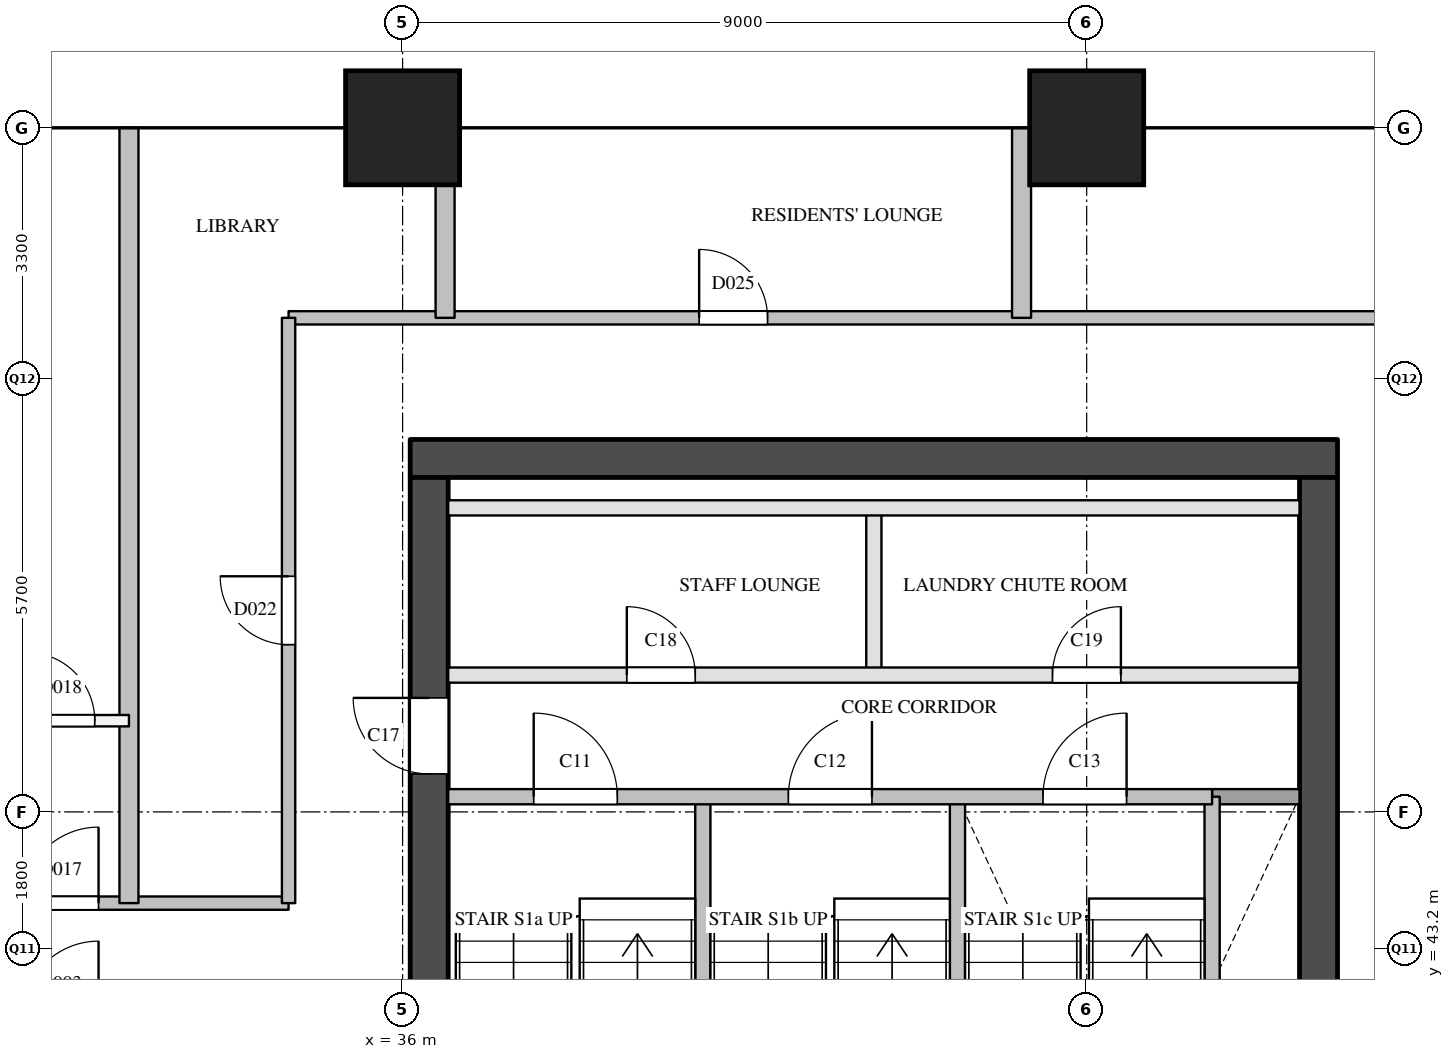
"""IFC4 building model, lengths in metres.
Left out: names, types, materials, properties, quantities, classifications, styles, units other than length and angle.
Written with IfcOpenShell. Run it as: python <this file> out.ifc"""

import sys

from ifc_helpers import new_model, si_unit, direction, frame, frame_2d, origin, origin_2d, place, context, subcontext, project, spatial, rectangle, extrude, element, fill, save


model = new_model("IFC4")
c1 = context("Model", 3, precision=1e-05, world=origin(), true_north=direction((0.0, 1.0)))
c2 = subcontext(c1, "Body", "Model", "MODEL_VIEW")
j1 = project(units=[si_unit("LENGTHUNIT", "METRE"), si_unit("PLANEANGLEUNIT", "RADIAN")], contexts=[c1])
p1 = place(None, origin())
s1 = spatial("IfcSite", under=j1, at=p1, CompositionType="ELEMENT")
p2 = place(p1, origin())
s2 = spatial("IfcBuilding", under=s1, at=p2, CompositionType="ELEMENT")
p3 = place(p2, frame((0.0, 0.0, 193.4)))
s3 = spatial("IfcBuildingStorey", under=s2, at=p3, CompositionType="ELEMENT", Elevation=193.4)
for number, where, z_axis, x_axis in (
    (1, (36.0, 54.0, 0.0), (0.0, 0.0, 1.0), (1.0, 0.0, 0.0)),
    (2, (45.0, 54.0, 0.0), (0.0, 0.0, 1.0), (1.0, 0.0, 0.0)),
):
    element("IfcColumn", number, at=place(p3, frame(where, z_axis=z_axis, x_axis=x_axis)), inside=s3, PredefinedType="COLUMN", context=c2, shape_type="SweptSolid", body=[
        extrude(rectangle(XDim=1.5, YDim=1.5, at=origin_2d()), origin(), (0.0, 0.0, 1.0), 3.9),
    ])
p4 = place(p3, frame((36.1, 49.65, 0.0), z_axis=(0.0, 0.0, 1.0), x_axis=(1.0, 0.0, 0.0)))
e3 = element("IfcWall", 3, at=p4, inside=s3, PredefinedType="SHEAR", context=c2, shape_type="SweptSolid", body=[
    extrude(rectangle(XDim=12.2, YDim=0.5, at=frame_2d((6.1, 0.0))), origin(), (0.0, 0.0, 1.0), 3.4),
])
p5 = place(p3, frame((36.35, 29.1, 0.0), z_axis=(0.0, 0.0, 1.0), x_axis=(0.0, 1.0, 0.0)))
e4 = element("IfcWall", 4, at=p5, inside=s3, PredefinedType="SHEAR", context=c2, shape_type="SweptSolid", body=[
    extrude(rectangle(XDim=20.3, YDim=0.5, at=frame_2d((10.15, 0.0))), origin(), (0.0, 0.0, 1.0), 3.4),
])
p6 = place(p5, frame((3.6, 0.0, 0.0)))
e5 = element("IfcOpeningElement", 5, at=p6, cuts=e4, PredefinedType="OPENING", context=c2, shape_type="SweptSolid", body=[
    extrude(rectangle(XDim=1.8, YDim=2.1, at=frame_2d((0.9, 1.05))), frame((0.0, 0.26, 0.0), z_axis=(0.0, -1.0, 0.0), x_axis=(1.0, 0.0, 0.0)), (0.0, 0.0, 1.0), 0.52),
])
p7 = place(p5, frame((16.4, 0.0, 0.0)))
e6 = element("IfcOpeningElement", 6, at=p7, cuts=e4, PredefinedType="OPENING", context=c2, shape_type="SweptSolid", body=[
    extrude(rectangle(XDim=1.0, YDim=2.1, at=frame_2d((0.5, 1.05))), frame((0.0, 0.26, 0.0), z_axis=(0.0, -1.0, 0.0), x_axis=(1.0, 0.0, 0.0)), (0.0, 0.0, 1.0), 0.52),
])
p8 = place(p3, frame((48.05, 29.1, 0.0), z_axis=(0.0, 0.0, 1.0), x_axis=(0.0, 1.0, 0.0)))
e7 = element("IfcWall", 7, at=p8, inside=s3, PredefinedType="SHEAR", context=c2, shape_type="SweptSolid", body=[
    extrude(rectangle(XDim=20.3, YDim=0.5, at=frame_2d((10.15, 0.0))), origin(), (0.0, 0.0, 1.0), 3.4),
])
p9 = place(p8, frame((12.5, 0.0, 0.0)))
e8 = element("IfcOpeningElement", 8, at=p9, cuts=e7, PredefinedType="OPENING", context=c2, shape_type="SweptSolid", body=[
    extrude(rectangle(XDim=0.7, YDim=2.1, at=frame_2d((0.35, 1.05))), frame((0.0, 0.26, 0.0), z_axis=(0.0, -1.0, 0.0), x_axis=(1.0, 0.0, 0.0)), (0.0, 0.0, 1.0), 0.52),
])
p10 = place(p8, frame((3.9, 0.0, 0.0)))
e9 = element("IfcOpeningElement", 9, at=p10, cuts=e7, PredefinedType="OPENING", context=c2, shape_type="SweptSolid", body=[
    extrude(rectangle(XDim=1.8, YDim=2.1, at=frame_2d((0.9, 1.05))), frame((0.0, 0.26, 0.0), z_axis=(0.0, -1.0, 0.0), x_axis=(1.0, 0.0, 0.0)), (0.0, 0.0, 1.0), 0.52),
])
p11 = place(p3, frame((39.95, 40.78, 0.0), z_axis=(0.0, 0.0, 1.0), x_axis=(0.0, 1.0, 0.0)))
e10 = element("IfcWall", 10, at=p11, inside=s3, PredefinedType="SOLIDWALL", context=c2, shape_type="SweptSolid", body=[
    extrude(rectangle(XDim=4.42, YDim=0.2, at=frame_2d((2.21, 0.0))), origin(), (0.0, 0.0, 1.0), 3.4),
])
p12 = place(p3, frame((42.2, 46.8, 0.0), z_axis=(0.0, 0.0, 1.0), x_axis=(0.0, 1.0, 0.0)))
e11 = element("IfcWall", 11, at=p12, inside=s3, PredefinedType="PARTITIONING", context=c2, shape_type="SweptSolid", body=[
    extrude(rectangle(XDim=2.2, YDim=0.2, at=frame_2d((1.1, 0.0))), origin(), (0.0, 0.0, 1.0), 3.4),
])
for number, where, z_axis, x_axis in (
    (12, (43.3, 40.78, 0.0), (0.0, 0.0, 1.0), (0.0, 1.0, 0.0)),
    (13, (46.65, 40.78, 0.0), (0.0, 0.0, 1.0), (0.0, 1.0, 0.0)),
):
    element("IfcWall", number, at=place(p3, frame(where, z_axis=z_axis, x_axis=x_axis)), inside=s3, PredefinedType="SOLIDWALL", context=c2, shape_type="SweptSolid", body=[
        extrude(rectangle(XDim=4.42, YDim=0.2, at=frame_2d((2.21, 0.0))), origin(), (0.0, 0.0, 1.0), 3.4),
    ])
p13 = place(p3, frame((46.65, 45.2, 0.0), z_axis=(0.0, 0.0, 1.0), x_axis=(1.0, 0.0, 0.0)))
e14 = element("IfcWall", 14, at=p13, inside=s3, PredefinedType="SOLIDWALL", context=c2, shape_type="SweptSolid", body=[
    extrude(rectangle(XDim=1.15, YDim=0.2, at=frame_2d((0.575, 0.0))), origin(), (0.0, 0.0, 1.0), 3.4),
])
p14 = place(p3, frame((36.6, 45.2, 0.0), z_axis=(0.0, 0.0, 1.0), x_axis=(1.0, 0.0, 0.0)))
e15 = element("IfcWall", 15, at=p14, inside=s3, PredefinedType="SOLIDWALL", context=c2, shape_type="SweptSolid", body=[
    extrude(rectangle(XDim=10.05, YDim=0.2, at=frame_2d((5.025, 0.0))), origin(), (0.0, 0.0, 1.0), 3.4),
])
p15 = place(p14, frame((1.125, 0.0, 0.0)))
e16 = element("IfcOpeningElement", 16, at=p15, cuts=e15, PredefinedType="OPENING", context=c2, shape_type="SweptSolid", body=[
    extrude(rectangle(XDim=1.1, YDim=2.1, at=frame_2d((0.55, 1.05))), frame((0.0, 0.11, 0.0), z_axis=(0.0, -1.0, 0.0), x_axis=(1.0, 0.0, 0.0)), (0.0, 0.0, 1.0), 0.22),
])
p16 = place(p14, frame((4.475, 0.0, 0.0)))
e17 = element("IfcOpeningElement", 17, at=p16, cuts=e15, PredefinedType="OPENING", context=c2, shape_type="SweptSolid", body=[
    extrude(rectangle(XDim=1.1, YDim=2.1, at=frame_2d((0.55, 1.05))), frame((0.0, 0.11, 0.0), z_axis=(0.0, -1.0, 0.0), x_axis=(1.0, 0.0, 0.0)), (0.0, 0.0, 1.0), 0.22),
])
p17 = place(p14, frame((7.825, 0.0, 0.0)))
e18 = element("IfcOpeningElement", 18, at=p17, cuts=e15, PredefinedType="OPENING", context=c2, shape_type="SweptSolid", body=[
    extrude(rectangle(XDim=1.1, YDim=2.1, at=frame_2d((0.55, 1.05))), frame((0.0, 0.11, 0.0), z_axis=(0.0, -1.0, 0.0), x_axis=(1.0, 0.0, 0.0)), (0.0, 0.0, 1.0), 0.22),
])
p18 = place(p3, frame((36.6, 46.8, 0.0), z_axis=(0.0, 0.0, 1.0), x_axis=(1.0, 0.0, 0.0)))
e19 = element("IfcWall", 19, at=p18, inside=s3, PredefinedType="PARTITIONING", context=c2, shape_type="SweptSolid", body=[
    extrude(rectangle(XDim=11.2, YDim=0.2, at=frame_2d((5.6, 0.0))), origin(), (0.0, 0.0, 1.0), 3.4),
])
p19 = place(p18, frame((2.35, 0.0, 0.0)))
e20 = element("IfcOpeningElement", 20, at=p19, cuts=e19, PredefinedType="OPENING", context=c2, shape_type="SweptSolid", body=[
    extrude(rectangle(XDim=0.9, YDim=2.1, at=frame_2d((0.45, 1.05))), frame((0.0, 0.11, 0.0), z_axis=(0.0, -1.0, 0.0), x_axis=(1.0, 0.0, 0.0)), (0.0, 0.0, 1.0), 0.22),
])
p20 = place(p18, frame((7.95, 0.0, 0.0)))
e21 = element("IfcOpeningElement", 21, at=p20, cuts=e19, PredefinedType="OPENING", context=c2, shape_type="SweptSolid", body=[
    extrude(rectangle(XDim=0.9, YDim=2.1, at=frame_2d((0.45, 1.05))), frame((0.0, 0.11, 0.0), z_axis=(0.0, -1.0, 0.0), x_axis=(1.0, 0.0, 0.0)), (0.0, 0.0, 1.0), 0.22),
])
p21 = place(p3, frame((36.6, 49.0, 0.0), z_axis=(0.0, 0.0, 1.0), x_axis=(1.0, 0.0, 0.0)))
e22 = element("IfcWall", 22, at=p21, inside=s3, PredefinedType="PARTITIONING", context=c2, shape_type="SweptSolid", body=[
    extrude(rectangle(XDim=11.2, YDim=0.2, at=frame_2d((5.6, 0.0))), origin(), (0.0, 0.0, 1.0), 3.4),
])
p22 = place(p3, frame((19.5, 43.8, 0.0), z_axis=(0.0, 0.0, 1.0), x_axis=(1.0, 0.0, 0.0)))
e23 = element("IfcWall", 23, at=p22, inside=s3, PredefinedType="PARTITIONING", context=c2, shape_type="SweptSolid", body=[
    extrude(rectangle(XDim=15.0, YDim=0.175, at=frame_2d((7.5, 0.0))), origin(), (0.0, 0.0, 1.0), 2.4),
])
p23 = place(p22, frame((2.5, 0.0, 0.0)))
e24 = element("IfcOpeningElement", 24, at=p23, cuts=e23, PredefinedType="OPENING", context=c2, shape_type="SweptSolid", body=[
    extrude(rectangle(XDim=1.0, YDim=2.1, at=frame_2d((0.5, 1.05))), frame((0.0, 0.097, 0.0), z_axis=(0.0, -1.0, 0.0), x_axis=(1.0, 0.0, 0.0)), (0.0, 0.0, 1.0), 0.195),
])
p24 = place(p22, frame((11.5, 0.0, 0.0)))
e25 = element("IfcOpeningElement", 25, at=p24, cuts=e23, PredefinedType="OPENING", context=c2, shape_type="SweptSolid", body=[
    extrude(rectangle(XDim=1.0, YDim=2.1, at=frame_2d((0.5, 1.05))), frame((0.0, 0.097, 0.0), z_axis=(0.0, -1.0, 0.0), x_axis=(1.0, 0.0, 0.0)), (0.0, 0.0, 1.0), 0.195),
])
p25 = place(p3, frame((34.5, 51.5, 0.0), z_axis=(0.0, 0.0, 1.0), x_axis=(1.0, 0.0, 0.0)))
e26 = element("IfcWall", 26, at=p25, inside=s3, PredefinedType="PARTITIONING", context=c2, shape_type="SweptSolid", body=[
    extrude(rectangle(XDim=15.4, YDim=0.175, at=frame_2d((7.7, 0.0))), origin(), (0.0, 0.0, 1.0), 3.4),
])
p26 = place(p25, frame((5.401, 0.0, 0.0)))
e27 = element("IfcOpeningElement", 27, at=p26, cuts=e26, PredefinedType="OPENING", context=c2, shape_type="SweptSolid", body=[
    extrude(rectangle(XDim=0.9, YDim=2.1, at=frame_2d((0.45, 1.05))), frame((0.0, 0.097, 0.0), z_axis=(0.0, -1.0, 0.0), x_axis=(1.0, 0.0, 0.0)), (0.0, 0.0, 1.0), 0.195),
])
p27 = place(p3, frame((34.5, 43.8, 0.0), z_axis=(0.0, 0.0, 1.0), x_axis=(0.0, 1.0, 0.0)))
e28 = element("IfcWall", 28, at=p27, inside=s3, PredefinedType="PARTITIONING", context=c2, shape_type="SweptSolid", body=[
    extrude(rectangle(XDim=7.7, YDim=0.175, at=frame_2d((3.85, 0.0))), origin(), (0.0, 0.0, 1.0), 3.4),
])
p28 = place(p27, frame((3.4, 0.0, 0.0)))
e29 = element("IfcOpeningElement", 29, at=p28, cuts=e28, PredefinedType="OPENING", context=c2, shape_type="SweptSolid", body=[
    extrude(rectangle(XDim=0.9, YDim=2.1, at=frame_2d((0.45, 1.05))), frame((0.0, 0.097, 0.0), z_axis=(0.0, -1.0, 0.0), x_axis=(1.0, 0.0, 0.0)), (0.0, 0.0, 1.0), 0.195),
])
p29 = place(p3, frame((30.6, 46.2, 0.0), z_axis=(0.0, 0.0, 1.0), x_axis=(1.0, 0.0, 0.0)))
e30 = element("IfcWall", 30, at=p29, inside=s3, PredefinedType="PARTITIONING", context=c2, shape_type="SweptSolid", body=[
    extrude(rectangle(XDim=1.8, YDim=0.15, at=frame_2d((0.9, 0.0))), origin(), (0.0, 0.0, 1.0), 3.4),
])
p30 = place(p29, frame((0.45, 0.0, 0.0)))
e31 = element("IfcOpeningElement", 31, at=p30, cuts=e30, PredefinedType="OPENING", context=c2, shape_type="SweptSolid", body=[
    extrude(rectangle(XDim=0.9, YDim=2.1, at=frame_2d((0.45, 1.05))), frame((0.0, 0.085, 0.0), z_axis=(0.0, -1.0, 0.0), x_axis=(1.0, 0.0, 0.0)), (0.0, 0.0, 1.0), 0.17),
])
p31 = place(p3, frame((32.4, 43.8, 0.0), z_axis=(0.0, 0.0, 1.0), x_axis=(0.0, 1.0, 0.0)))
e32 = element("IfcWall", 32, at=p31, inside=s3, PredefinedType="PARTITIONING", context=c2, shape_type="SweptSolid", body=[
    extrude(rectangle(XDim=10.2, YDim=0.25, at=frame_2d((5.1, 0.0))), origin(), (0.0, 0.0, 1.0), 2.4),
])
p32 = place(p3, frame((36.559, 51.5, 0.0), z_axis=(0.0, 0.0, 1.0), x_axis=(0.0, 1.0, 0.0)))
e33 = element("IfcWall", 33, at=p32, inside=s3, PredefinedType="PARTITIONING", context=c2, shape_type="SweptSolid", body=[
    extrude(rectangle(XDim=2.5, YDim=0.25, at=frame_2d((1.25, 0.0))), origin(), (0.0, 0.0, 1.0), 3.4),
])
p33 = place(p3, frame((44.143, 51.5, 0.0), z_axis=(0.0, 0.0, 1.0), x_axis=(0.0, 1.0, 0.0)))
e34 = element("IfcWall", 34, at=p33, inside=s3, PredefinedType="PARTITIONING", context=c2, shape_type="SweptSolid", body=[
    extrude(rectangle(XDim=2.5, YDim=0.25, at=frame_2d((1.25, 0.0))), origin(), (0.0, 0.0, 1.0), 2.4),
])
p34 = place(p15, origin())
e35 = element("IfcDoor", 35, at=p34, inside=s3, OperationType="SINGLE_SWING_LEFT", PredefinedType="DOOR", context=c2, shape_type="SweptSolid", body=[
    extrude(rectangle(XDim=1.1, YDim=2.1, at=frame_2d((0.55, 1.05))), frame((0.0, 0.025, 0.0), z_axis=(0.0, -1.0, 0.0), x_axis=(1.0, 0.0, 0.0)), (0.0, 0.0, 1.0), 0.05),
])
fill(e16, e35)
p35 = place(p16, origin())
e36 = element("IfcDoor", 36, at=p35, inside=s3, OperationType="SINGLE_SWING_RIGHT", PredefinedType="DOOR", context=c2, shape_type="SweptSolid", body=[
    extrude(rectangle(XDim=1.1, YDim=2.1, at=frame_2d((0.55, 1.05))), frame((0.0, 0.025, 0.0), z_axis=(0.0, -1.0, 0.0), x_axis=(1.0, 0.0, 0.0)), (0.0, 0.0, 1.0), 0.05),
])
fill(e17, e36)
p36 = place(p17, origin())
e37 = element("IfcDoor", 37, at=p36, inside=s3, OperationType="SINGLE_SWING_RIGHT", PredefinedType="DOOR", context=c2, shape_type="SweptSolid", body=[
    extrude(rectangle(XDim=1.1, YDim=2.1, at=frame_2d((0.55, 1.05))), frame((0.0, 0.025, 0.0), z_axis=(0.0, -1.0, 0.0), x_axis=(1.0, 0.0, 0.0)), (0.0, 0.0, 1.0), 0.05),
])
fill(e18, e37)
p37 = place(p7, origin())
e38 = element("IfcDoor", 38, at=p37, inside=s3, OperationType="SINGLE_SWING_RIGHT", PredefinedType="DOOR", context=c2, shape_type="SweptSolid", body=[
    extrude(rectangle(XDim=1.0, YDim=2.1, at=frame_2d((0.5, 1.05))), frame((0.0, 0.025, 0.0), z_axis=(0.0, -1.0, 0.0), x_axis=(1.0, 0.0, 0.0)), (0.0, 0.0, 1.0), 0.05),
])
fill(e6, e38)
p38 = place(p19, origin())
e39 = element("IfcDoor", 39, at=p38, inside=s3, OperationType="SINGLE_SWING_LEFT", PredefinedType="DOOR", context=c2, shape_type="SweptSolid", body=[
    extrude(rectangle(XDim=0.9, YDim=2.1, at=frame_2d((0.45, 1.05))), frame((0.0, 0.025, 0.0), z_axis=(0.0, -1.0, 0.0), x_axis=(1.0, 0.0, 0.0)), (0.0, 0.0, 1.0), 0.05),
])
fill(e20, e39)
p39 = place(p20, origin())
e40 = element("IfcDoor", 40, at=p39, inside=s3, OperationType="SINGLE_SWING_RIGHT", PredefinedType="DOOR", context=c2, shape_type="SweptSolid", body=[
    extrude(rectangle(XDim=0.9, YDim=2.1, at=frame_2d((0.45, 1.05))), frame((0.0, 0.025, 0.0), z_axis=(0.0, -1.0, 0.0), x_axis=(1.0, 0.0, 0.0)), (0.0, 0.0, 1.0), 0.05),
])
fill(e21, e40)
p40 = place(p24, origin())
e41 = element("IfcDoor", 41, at=p40, inside=s3, OperationType="SINGLE_SWING_RIGHT", PredefinedType="DOOR", context=c2, shape_type="SweptSolid", body=[
    extrude(rectangle(XDim=1.0, YDim=2.1, at=frame_2d((0.5, 1.05))), frame((0.0, 0.025, 0.0), z_axis=(0.0, -1.0, 0.0), x_axis=(1.0, 0.0, 0.0)), (0.0, 0.0, 1.0), 0.05),
])
fill(e25, e41)
p41 = place(p30, origin())
e42 = element("IfcDoor", 42, at=p41, inside=s3, OperationType="SINGLE_SWING_LEFT", PredefinedType="DOOR", context=c2, shape_type="SweptSolid", body=[
    extrude(rectangle(XDim=0.9, YDim=2.1, at=frame_2d((0.45, 1.05))), frame((0.0, 0.025, 0.0), z_axis=(0.0, -1.0, 0.0), x_axis=(1.0, 0.0, 0.0)), (0.0, 0.0, 1.0), 0.05),
])
fill(e31, e42)
p42 = place(p28, origin())
e43 = element("IfcDoor", 43, at=p42, inside=s3, OperationType="SINGLE_SWING_RIGHT", PredefinedType="DOOR", context=c2, shape_type="SweptSolid", body=[
    extrude(rectangle(XDim=0.9, YDim=2.1, at=frame_2d((0.45, 1.05))), frame((0.0, 0.025, 0.0), z_axis=(0.0, -1.0, 0.0), x_axis=(1.0, 0.0, 0.0)), (0.0, 0.0, 1.0), 0.05),
])
fill(e29, e43)
p43 = place(p26, origin())
e44 = element("IfcDoor", 44, at=p43, inside=s3, OperationType="SINGLE_SWING_LEFT", PredefinedType="DOOR", context=c2, shape_type="SweptSolid", body=[
    extrude(rectangle(XDim=0.9, YDim=2.1, at=frame_2d((0.45, 1.05))), frame((0.0, 0.025, 0.0), z_axis=(0.0, -1.0, 0.0), x_axis=(1.0, 0.0, 0.0)), (0.0, 0.0, 1.0), 0.05),
])
fill(e27, e44)
save(model, sys.argv[1])
